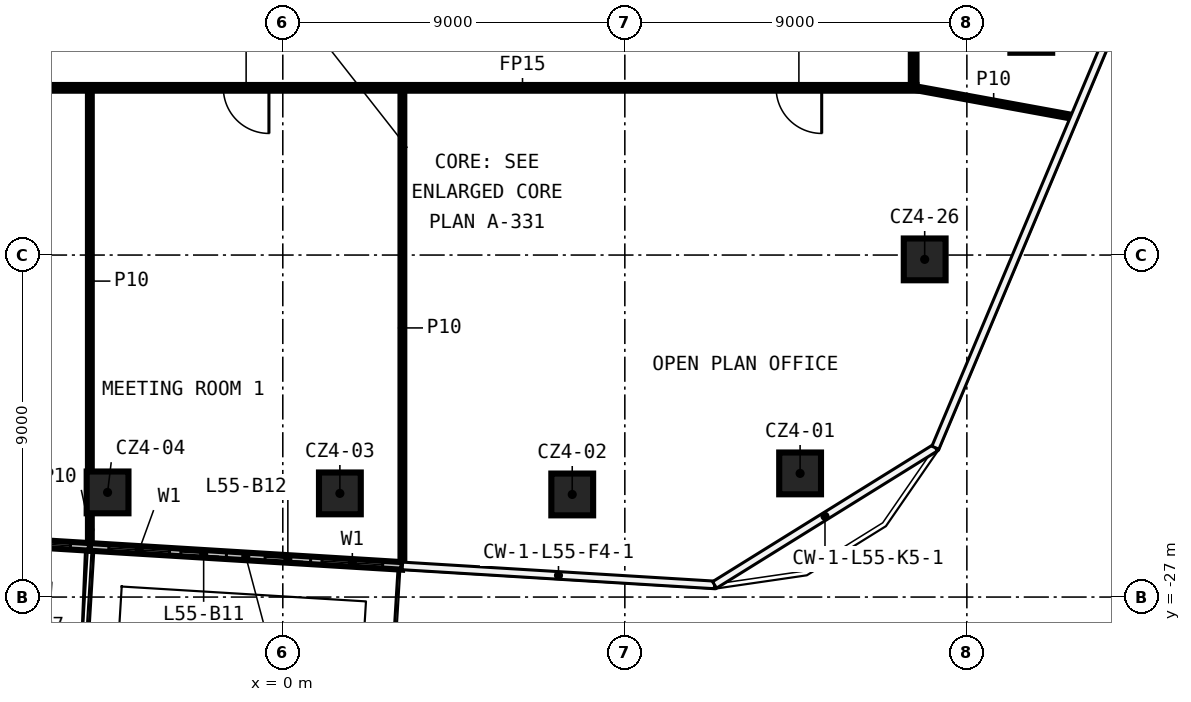
"""IFC4 building model, lengths in metres.
Left out: names, types, materials, properties, quantities, classifications, styles, units other than length and angle.
Written with IfcOpenShell. Run it as: python <this file> out.ifc"""

import sys

from ifc_helpers import new_model, si_unit, direction, frame, frame_2d, origin, origin_2d, place, context, subcontext, project, spatial, rectangle, extrude, element, fill, save


model = new_model("IFC4")
c1 = context("Model", 3, precision=1e-05, world=origin(), true_north=direction((0.0, 1.0)))
c2 = subcontext(c1, "Body", "Model", "MODEL_VIEW")
j1 = project(units=[si_unit("LENGTHUNIT", "METRE"), si_unit("PLANEANGLEUNIT", "RADIAN")], contexts=[c1])
p1 = place(None, origin())
s1 = spatial("IfcSite", under=j1, at=p1, CompositionType="ELEMENT")
p2 = place(p1, origin())
s2 = spatial("IfcBuilding", under=s1, at=p2, CompositionType="ELEMENT")
p3 = place(p2, frame((0.0, 0.0, 262.2)))
s3 = spatial("IfcBuildingStorey", under=s2, at=p3, CompositionType="ELEMENT", Elevation=262.2)
for number, where, z_axis, x_axis in (
    (1, (13.612, -23.746, 0.0), (0.0, 0.0, 1.0), (1.0, 0.0, 0.0)),
    (2, (7.616, -24.3, 0.0), (0.0, 0.0, 1.0), (1.0, 0.0, 0.0)),
    (3, (1.502, -24.272, 0.0), (0.0, 0.0, 1.0), (1.0, 0.0, 0.0)),
    (4, (-4.611, -24.246, 0.0), (0.0, 0.0, 1.0), (1.0, 0.0, 0.0)),
    (5, (19.695, -12.127, 0.0), (0.0, 0.0, 1.0), (1.0, 0.0, 0.0)),
    (6, (16.89, -18.114, 0.0), (0.0, 0.0, 1.0), (1.0, 0.0, 0.0)),
):
    element("IfcColumn", number, at=place(p3, frame(where, z_axis=z_axis, x_axis=x_axis)), inside=s3, PredefinedType="COLUMN", context=c2, shape_type="SweptSolid", body=[
        extrude(rectangle(XDim=1.1, YDim=1.1, at=origin_2d()), origin(), (0.0, 0.0, 1.0), 3.82),
    ])
p4 = place(p3, frame((16.675, -13.6, 0.0), z_axis=(0.0, 0.0, 1.0), x_axis=(-1.0, 0.0, 0.0)))
e7 = element("IfcWall", 7, at=p4, inside=s3, PredefinedType="PARTITIONING", context=c2, shape_type="SweptSolid", body=[
    extrude(rectangle(XDim=32.75, YDim=0.15, at=frame_2d((16.375, 0.0))), origin(), (0.0, 0.0, 1.0), 3.82),
])
p5 = place(p4, frame((29.587, 0.0, 0.0)))
e8 = element("IfcOpeningElement", 8, at=p5, cuts=e7, PredefinedType="OPENING", context=c2, shape_type="SweptSolid", body=[
    extrude(rectangle(XDim=1.2, YDim=2.1, at=frame_2d((0.6, 1.05))), frame((0.0, 0.085, 0.0), z_axis=(0.0, -1.0, 0.0), x_axis=(1.0, 0.0, 0.0)), (0.0, 0.0, 1.0), 0.17),
])
p6 = place(p4, frame((17.04, 0.0, 0.0)))
e9 = element("IfcOpeningElement", 9, at=p6, cuts=e7, PredefinedType="OPENING", context=c2, shape_type="SweptSolid", body=[
    extrude(rectangle(XDim=1.2, YDim=2.1, at=frame_2d((0.6, 1.05))), frame((0.0, 0.085, 0.0), z_axis=(0.0, -1.0, 0.0), x_axis=(1.0, 0.0, 0.0)), (0.0, 0.0, 1.0), 0.17),
])
p7 = place(p4, frame((2.495, 0.0, 0.0)))
e10 = element("IfcOpeningElement", 10, at=p7, cuts=e7, PredefinedType="OPENING", context=c2, shape_type="SweptSolid", body=[
    extrude(rectangle(XDim=1.2, YDim=2.1, at=frame_2d((0.6, 1.05))), frame((0.0, 0.085, 0.0), z_axis=(0.0, -1.0, 0.0), x_axis=(1.0, 0.0, 0.0)), (0.0, 0.0, 1.0), 0.17),
])
p8 = place(p3, frame((16.6, 13.525, 0.0), z_axis=(0.0, 0.0, 1.0), x_axis=(0.0, -1.0, 0.0)))
e11 = element("IfcWall", 11, at=p8, inside=s3, PredefinedType="PARTITIONING", context=c2, shape_type="SweptSolid", body=[
    extrude(rectangle(XDim=27.05, YDim=0.15, at=frame_2d((13.525, 0.0))), origin(), (0.0, 0.0, 1.0), 3.82),
])
p9 = place(p8, frame((22.559, 0.0, 0.0)))
e12 = element("IfcOpeningElement", 12, at=p9, cuts=e11, PredefinedType="OPENING", context=c2, shape_type="SweptSolid", body=[
    extrude(rectangle(XDim=1.2, YDim=2.1, at=frame_2d((0.6, 1.05))), frame((0.0, 0.085, 0.0), z_axis=(0.0, -1.0, 0.0), x_axis=(1.0, 0.0, 0.0)), (0.0, 0.0, 1.0), 0.17),
])
p10 = place(p8, frame((11.036, 0.0, 0.0)))
e13 = element("IfcOpeningElement", 13, at=p10, cuts=e11, PredefinedType="OPENING", context=c2, shape_type="SweptSolid", body=[
    extrude(rectangle(XDim=1.2, YDim=2.1, at=frame_2d((0.6, 1.05))), frame((0.0, 0.085, 0.0), z_axis=(0.0, -1.0, 0.0), x_axis=(1.0, 0.0, 0.0)), (0.0, 0.0, 1.0), 0.17),
])
p11 = place(p3, frame((3.147, -26.161, 0.0), z_axis=(0.0, 0.0, 1.0), x_axis=(0.0, 1.0, 0.0)))
e14 = element("IfcWall", 14, at=p11, inside=s3, PredefinedType="PARTITIONING", context=c2, shape_type="SweptSolid", body=[
    extrude(rectangle(XDim=12.486, YDim=0.1, at=frame_2d((6.243, 0.0))), origin(), (0.0, 0.0, 1.0), 3.82),
])
p12 = place(p3, frame((-5.077, -25.66, 0.0), z_axis=(0.0, 0.0, 1.0), x_axis=(0.0, 1.0, 0.0)))
e15 = element("IfcWall", 15, at=p12, inside=s3, PredefinedType="PARTITIONING", context=c2, shape_type="SweptSolid", body=[
    extrude(rectangle(XDim=0.864, YDim=0.1, at=frame_2d((0.432, 0.0))), origin(), (0.0, 0.0, 1.0), 3.82),
])
p13 = place(p3, frame((-5.077, -23.696, 0.0), z_axis=(0.0, 0.0, 1.0), x_axis=(0.0, 1.0, 0.0)))
e16 = element("IfcWall", 16, at=p13, inside=s3, PredefinedType="PARTITIONING", context=c2, shape_type="SweptSolid", body=[
    extrude(rectangle(XDim=10.021, YDim=0.1, at=frame_2d((5.01, 0.0))), origin(), (0.0, 0.0, 1.0), 3.82),
])
p14 = place(p3, frame((16.6, -13.6, 0.0), z_axis=(0.0, 0.0, 1.0), x_axis=(0.983699688502, -0.179819139254, 0.0)))
e17 = element("IfcWall", 17, at=p14, inside=s3, PredefinedType="PARTITIONING", context=c2, shape_type="SweptSolid", body=[
    extrude(rectangle(XDim=4.28, YDim=0.1, at=frame_2d((2.14, 0.0))), origin(), (0.0, 0.0, 1.0), 3.82),
])
p15 = place(p3, frame((-5.077, -25.68, 0.0), z_axis=(0.0, 0.0, 1.0), x_axis=(0.998153501879, -0.060741968084, 0.0)))
e18 = element("IfcWall", 18, at=p15, inside=s3, PredefinedType="SOLIDWALL", context=c2, shape_type="SweptSolid", body=[
    extrude(rectangle(XDim=8.24, YDim=0.2, at=frame_2d((4.12, 0.0))), origin(), (0.0, 0.0, 1.0), 3.82),
])
p16 = place(p15, frame((0.5, 0.0, 0.6)))
e19 = element("IfcOpeningElement", 19, at=p16, cuts=e18, PredefinedType="OPENING", context=c2, shape_type="SweptSolid", body=[
    extrude(rectangle(XDim=1.6, YDim=2.4, at=frame_2d((0.8, 1.2))), frame((0.0, 0.11, 0.0), z_axis=(0.0, -1.0, 0.0), x_axis=(1.0, 0.0, 0.0)), (0.0, 0.0, 1.0), 0.22),
])
p17 = place(p15, frame((2.4, 0.0, 0.0)))
e20 = element("IfcOpeningElement", 20, at=p17, cuts=e18, PredefinedType="OPENING", context=c2, shape_type="SweptSolid", body=[
    extrude(rectangle(XDim=1.2, YDim=2.4, at=frame_2d((0.6, 1.2))), frame((0.0, 0.11, 0.0), z_axis=(0.0, -1.0, 0.0), x_axis=(1.0, 0.0, 0.0)), (0.0, 0.0, 1.0), 0.22),
])
p18 = place(p15, frame((6.12, 0.0, 0.6)))
e21 = element("IfcOpeningElement", 21, at=p18, cuts=e18, PredefinedType="OPENING", context=c2, shape_type="SweptSolid", body=[
    extrude(rectangle(XDim=1.6, YDim=2.4, at=frame_2d((0.8, 1.2))), frame((0.0, 0.11, 0.0), z_axis=(0.0, -1.0, 0.0), x_axis=(1.0, 0.0, 0.0)), (0.0, 0.0, 1.0), 0.22),
])
p19 = place(p15, frame((4.62, 0.0, 0.0)))
e22 = element("IfcOpeningElement", 22, at=p19, cuts=e18, PredefinedType="OPENING", context=c2, shape_type="SweptSolid", body=[
    extrude(rectangle(XDim=1.2, YDim=2.4, at=frame_2d((0.6, 1.2))), frame((0.0, 0.11, 0.0), z_axis=(0.0, -1.0, 0.0), x_axis=(1.0, 0.0, 0.0)), (0.0, 0.0, 1.0), 0.22),
])
p20 = place(p3, frame((-9.181, -25.43, 0.0), z_axis=(0.0, 0.0, 1.0), x_axis=(0.998152924564, -0.060751454178, 0.0)))
e23 = element("IfcWall", 23, at=p20, inside=s3, PredefinedType="SOLIDWALL", context=c2, shape_type="SweptSolid", body=[
    extrude(rectangle(XDim=4.111, YDim=0.2, at=frame_2d((2.056, 0.0))), origin(), (0.0, 0.0, 1.0), 3.82),
])
p21 = place(p20, frame((2.0, 0.0, 0.6)))
e24 = element("IfcOpeningElement", 24, at=p21, cuts=e23, PredefinedType="OPENING", context=c2, shape_type="SweptSolid", body=[
    extrude(rectangle(XDim=1.6, YDim=2.4, at=frame_2d((0.8, 1.2))), frame((0.0, 0.11, 0.0), z_axis=(0.0, -1.0, 0.0), x_axis=(1.0, 0.0, 0.0)), (0.0, 0.0, 1.0), 0.22),
])
p22 = place(p20, frame((0.5, 0.0, 0.0)))
e25 = element("IfcOpeningElement", 25, at=p22, cuts=e23, PredefinedType="OPENING", context=c2, shape_type="SweptSolid", body=[
    extrude(rectangle(XDim=1.2, YDim=2.4, at=frame_2d((0.6, 1.2))), frame((0.0, 0.11, 0.0), z_axis=(0.0, -1.0, 0.0), x_axis=(1.0, 0.0, 0.0)), (0.0, 0.0, 1.0), 0.22),
])
p23 = place(p6, origin())
e26 = element("IfcDoor", 26, at=p23, inside=s3, OperationType="SINGLE_SWING_LEFT", PredefinedType="DOOR", context=c2, shape_type="SweptSolid", body=[
    extrude(rectangle(XDim=1.2, YDim=2.1, at=frame_2d((0.6, 1.05))), frame((0.0, 0.025, 0.0), z_axis=(0.0, -1.0, 0.0), x_axis=(1.0, 0.0, 0.0)), (0.0, 0.0, 1.0), 0.05),
])
fill(e9, e26)
p24 = place(p7, origin())
e27 = element("IfcDoor", 27, at=p24, inside=s3, OperationType="SINGLE_SWING_RIGHT", PredefinedType="DOOR", context=c2, shape_type="SweptSolid", body=[
    extrude(rectangle(XDim=1.2, YDim=2.1, at=frame_2d((0.6, 1.05))), frame((0.0, 0.025, 0.0), z_axis=(0.0, -1.0, 0.0), x_axis=(1.0, 0.0, 0.0)), (0.0, 0.0, 1.0), 0.05),
])
fill(e10, e27)
p25 = place(p16, origin())
e28 = element("IfcWindow", 28, at=p25, inside=s3, PartitioningType="SINGLE_PANEL", PredefinedType="WINDOW", context=c2, shape_type="SweptSolid", body=[
    extrude(rectangle(XDim=1.6, YDim=2.4, at=frame_2d((0.8, 1.2))), frame((0.0, 0.03, 0.0), z_axis=(0.0, -1.0, 0.0), x_axis=(1.0, 0.0, 0.0)), (0.0, 0.0, 1.0), 0.06),
])
fill(e19, e28)
p26 = place(p17, origin())
e29 = element("IfcDoor", 29, at=p26, inside=s3, OperationType="SLIDING_TO_LEFT", PredefinedType="DOOR", context=c2, shape_type="SweptSolid", body=[
    extrude(rectangle(XDim=1.2, YDim=2.4, at=frame_2d((0.6, 1.2))), frame((0.0, 0.025, 0.0), z_axis=(0.0, -1.0, 0.0), x_axis=(1.0, 0.0, 0.0)), (0.0, 0.0, 1.0), 0.05),
])
fill(e20, e29)
p27 = place(p18, origin())
e30 = element("IfcWindow", 30, at=p27, inside=s3, PartitioningType="SINGLE_PANEL", PredefinedType="WINDOW", context=c2, shape_type="SweptSolid", body=[
    extrude(rectangle(XDim=1.6, YDim=2.4, at=frame_2d((0.8, 1.2))), frame((0.0, 0.03, 0.0), z_axis=(0.0, -1.0, 0.0), x_axis=(1.0, 0.0, 0.0)), (0.0, 0.0, 1.0), 0.06),
])
fill(e21, e30)
p28 = place(p19, origin())
e31 = element("IfcDoor", 31, at=p28, inside=s3, OperationType="SLIDING_TO_LEFT", PredefinedType="DOOR", context=c2, shape_type="SweptSolid", body=[
    extrude(rectangle(XDim=1.2, YDim=2.4, at=frame_2d((0.6, 1.2))), frame((0.0, 0.025, 0.0), z_axis=(0.0, -1.0, 0.0), x_axis=(1.0, 0.0, 0.0)), (0.0, 0.0, 1.0), 0.05),
])
fill(e22, e31)
p29 = place(p21, origin())
e32 = element("IfcWindow", 32, at=p29, inside=s3, PartitioningType="SINGLE_PANEL", PredefinedType="WINDOW", context=c2, shape_type="SweptSolid", body=[
    extrude(rectangle(XDim=1.6, YDim=2.4, at=frame_2d((0.8, 1.2))), frame((0.0, 0.03, 0.0), z_axis=(0.0, -1.0, 0.0), x_axis=(1.0, 0.0, 0.0)), (0.0, 0.0, 1.0), 0.06),
])
fill(e24, e32)
save(model, sys.argv[1])
